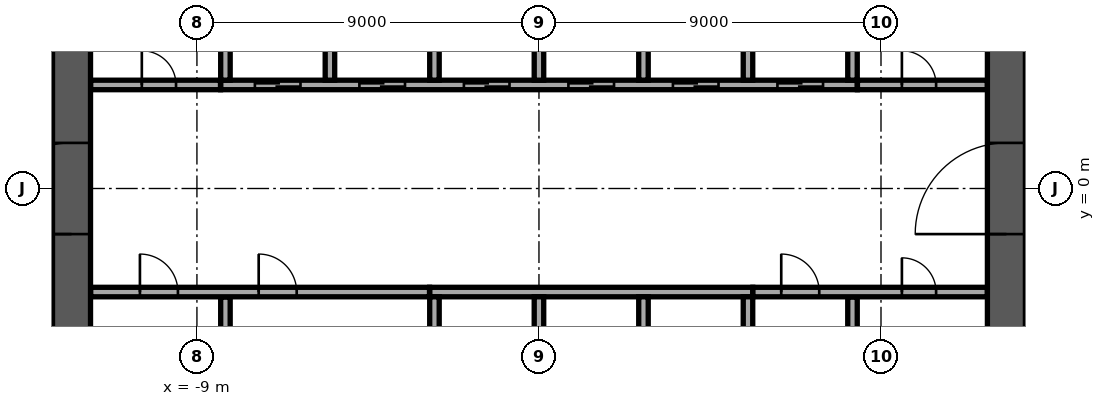
"""IFC4 building model, lengths in metres.
Left out: names, types, materials, properties, quantities, classifications, styles, units other than length and angle.
Written with IfcOpenShell. Run it as: python <this file> out.ifc"""

import sys

from ifc_helpers import new_model, si_unit, direction, frame, frame_2d, origin, place, context, subcontext, project, spatial, rectangle, extrude, element, fill, save


model = new_model("IFC4")
c1 = context("Model", 3, precision=1e-05, world=origin(), true_north=direction((0.0, 1.0)))
c2 = subcontext(c1, "Body", "Model", "MODEL_VIEW")
j1 = project(units=[si_unit("LENGTHUNIT", "METRE"), si_unit("PLANEANGLEUNIT", "RADIAN")], contexts=[c1])
p1 = place(None, origin())
s1 = spatial("IfcSite", under=j1, at=p1, CompositionType="ELEMENT")
p2 = place(p1, origin())
s2 = spatial("IfcBuilding", under=s1, at=p2, CompositionType="ELEMENT")
p3 = place(p2, frame((0.0, 0.0, 183.7)))
s3 = spatial("IfcBuildingStorey", under=s2, at=p3, CompositionType="ELEMENT", Elevation=183.7)
p4 = place(p3, frame((12.3, -11.8, 0.0), z_axis=(0.0, 0.0, 1.0), x_axis=(0.0, 1.0, 0.0)))
e1 = element("IfcWall", 1, at=p4, inside=s3, PredefinedType="SHEAR", context=c2, shape_type="SweptSolid", body=[
    extrude(rectangle(XDim=23.6, YDim=1.0, at=frame_2d((11.8, 0.0))), origin(), (0.0, 0.0, 1.0), 5.22),
])
p5 = place(p4, frame((10.6, 0.0, 0.0)))
e2 = element("IfcOpeningElement", 2, at=p5, cuts=e1, PredefinedType="OPENING", context=c2, shape_type="SweptSolid", body=[
    extrude(rectangle(XDim=2.4, YDim=2.4, at=frame_2d((1.2, 1.2))), frame((0.0, 0.51, 0.0), z_axis=(0.0, -1.0, 0.0), x_axis=(1.0, 0.0, 0.0)), (0.0, 0.0, 1.0), 1.02),
])
p6 = place(p3, frame((-12.3, -11.8, 0.0), z_axis=(0.0, 0.0, 1.0), x_axis=(0.0, 1.0, 0.0)))
e3 = element("IfcWall", 3, at=p6, inside=s3, PredefinedType="SHEAR", context=c2, shape_type="SweptSolid", body=[
    extrude(rectangle(XDim=23.6, YDim=1.0, at=frame_2d((11.8, 0.0))), origin(), (0.0, 0.0, 1.0), 5.22),
])
p7 = place(p6, frame((10.6, 0.0, 0.0)))
e4 = element("IfcOpeningElement", 4, at=p7, cuts=e3, PredefinedType="OPENING", context=c2, shape_type="SweptSolid", body=[
    extrude(rectangle(XDim=2.4, YDim=2.4, at=frame_2d((1.2, 1.2))), frame((0.0, 0.51, 0.0), z_axis=(0.0, -1.0, 0.0), x_axis=(1.0, 0.0, 0.0)), (0.0, 0.0, 1.0), 1.02),
])
p8 = place(p3, frame((-8.375, 2.725, 0.0), z_axis=(0.0, 0.0, 1.0), x_axis=(1.0, 0.0, 0.0)))
e5 = element("IfcWall", 5, at=p8, inside=s3, PredefinedType="SOLIDWALL", context=c2, shape_type="SweptSolid", body=[
    extrude(rectangle(XDim=16.75, YDim=0.25, at=frame_2d((8.375, 0.0))), origin(), (0.0, 0.0, 1.0), 5.22),
])
p9 = place(p8, frame((0.9, 0.0, 0.0)))
e6 = element("IfcOpeningElement", 6, at=p9, cuts=e5, PredefinedType="OPENING", context=c2, shape_type="SweptSolid", body=[
    extrude(rectangle(XDim=1.2, YDim=2.1, at=frame_2d((0.6, 1.05))), frame((0.0, 0.135, 0.0), z_axis=(0.0, -1.0, 0.0), x_axis=(1.0, 0.0, 0.0)), (0.0, 0.0, 1.0), 0.27),
])
p10 = place(p8, frame((3.65, 0.0, 0.0)))
e7 = element("IfcOpeningElement", 7, at=p10, cuts=e5, PredefinedType="OPENING", context=c2, shape_type="SweptSolid", body=[
    extrude(rectangle(XDim=1.2, YDim=2.1, at=frame_2d((0.6, 1.05))), frame((0.0, 0.135, 0.0), z_axis=(0.0, -1.0, 0.0), x_axis=(1.0, 0.0, 0.0)), (0.0, 0.0, 1.0), 0.27),
])
p11 = place(p8, frame((6.4, 0.0, 0.0)))
e8 = element("IfcOpeningElement", 8, at=p11, cuts=e5, PredefinedType="OPENING", context=c2, shape_type="SweptSolid", body=[
    extrude(rectangle(XDim=1.2, YDim=2.1, at=frame_2d((0.6, 1.05))), frame((0.0, 0.135, 0.0), z_axis=(0.0, -1.0, 0.0), x_axis=(1.0, 0.0, 0.0)), (0.0, 0.0, 1.0), 0.27),
])
p12 = place(p8, frame((9.15, 0.0, 0.0)))
e9 = element("IfcOpeningElement", 9, at=p12, cuts=e5, PredefinedType="OPENING", context=c2, shape_type="SweptSolid", body=[
    extrude(rectangle(XDim=1.2, YDim=2.1, at=frame_2d((0.6, 1.05))), frame((0.0, 0.135, 0.0), z_axis=(0.0, -1.0, 0.0), x_axis=(1.0, 0.0, 0.0)), (0.0, 0.0, 1.0), 0.27),
])
p13 = place(p8, frame((11.9, 0.0, 0.0)))
e10 = element("IfcOpeningElement", 10, at=p13, cuts=e5, PredefinedType="OPENING", context=c2, shape_type="SweptSolid", body=[
    extrude(rectangle(XDim=1.2, YDim=2.1, at=frame_2d((0.6, 1.05))), frame((0.0, 0.135, 0.0), z_axis=(0.0, -1.0, 0.0), x_axis=(1.0, 0.0, 0.0)), (0.0, 0.0, 1.0), 0.27),
])
p14 = place(p8, frame((14.65, 0.0, 0.0)))
e11 = element("IfcOpeningElement", 11, at=p14, cuts=e5, PredefinedType="OPENING", context=c2, shape_type="SweptSolid", body=[
    extrude(rectangle(XDim=1.2, YDim=2.1, at=frame_2d((0.6, 1.05))), frame((0.0, 0.135, 0.0), z_axis=(0.0, -1.0, 0.0), x_axis=(1.0, 0.0, 0.0)), (0.0, 0.0, 1.0), 0.27),
])
for number, where, z_axis, x_axis in (
    (12, (-8.25, 2.85, 0.0), (0.0, 0.0, 1.0), (0.0, 1.0, 0.0)),
    (13, (-5.5, 2.85, 0.0), (0.0, 0.0, 1.0), (0.0, 1.0, 0.0)),
    (14, (-2.75, 2.85, 0.0), (0.0, 0.0, 1.0), (0.0, 1.0, 0.0)),
    (15, (0.0, 2.85, 0.0), (0.0, 0.0, 1.0), (0.0, 1.0, 0.0)),
    (16, (2.75, 2.85, 0.0), (0.0, 0.0, 1.0), (0.0, 1.0, 0.0)),
    (17, (5.5, 2.85, 0.0), (0.0, 0.0, 1.0), (0.0, 1.0, 0.0)),
    (18, (8.25, 2.85, 0.0), (0.0, 0.0, 1.0), (0.0, 1.0, 0.0)),
):
    element("IfcWall", number, at=place(p3, frame(where, z_axis=z_axis, x_axis=x_axis)), inside=s3, PredefinedType="SOLIDWALL", context=c2, shape_type="SweptSolid", body=[
        extrude(rectangle(XDim=2.7, YDim=0.25, at=frame_2d((1.35, 0.0))), origin(), (0.0, 0.0, 1.0), 5.22),
    ])
p15 = place(p3, frame((-2.875, -2.725, 0.0), z_axis=(0.0, 0.0, 1.0), x_axis=(1.0, 0.0, 0.0)))
e19 = element("IfcWall", 19, at=p15, inside=s3, PredefinedType="SOLIDWALL", context=c2, shape_type="SweptSolid", body=[
    extrude(rectangle(XDim=8.5, YDim=0.25, at=frame_2d((4.25, 0.0))), origin(), (0.0, 0.0, 1.0), 5.22),
])
for number, where, z_axis, x_axis in (
    (20, (-2.75, -5.55, 0.0), (0.0, 0.0, 1.0), (0.0, 1.0, 0.0)),
    (21, (0.0, -5.55, 0.0), (0.0, 0.0, 1.0), (0.0, 1.0, 0.0)),
    (22, (2.75, -5.55, 0.0), (0.0, 0.0, 1.0), (0.0, 1.0, 0.0)),
    (23, (5.5, -5.55, 0.0), (0.0, 0.0, 1.0), (0.0, 1.0, 0.0)),
):
    element("IfcWall", number, at=place(p3, frame(where, z_axis=z_axis, x_axis=x_axis)), inside=s3, PredefinedType="SOLIDWALL", context=c2, shape_type="SweptSolid", body=[
        extrude(rectangle(XDim=2.7, YDim=0.25, at=frame_2d((1.35, 0.0))), origin(), (0.0, 0.0, 1.0), 5.22),
    ])
for number, where, z_axis, x_axis in (
    (24, (-8.25, -5.545, 0.0), (0.0, 0.0, 1.0), (0.0, 1.0, 0.0)),
    (25, (8.25, -5.545, 0.0), (0.0, 0.0, 1.0), (0.0, 1.0, 0.0)),
):
    element("IfcWall", number, at=place(p3, frame(where, z_axis=z_axis, x_axis=x_axis)), inside=s3, PredefinedType="PARTITIONING", context=c2, shape_type="SweptSolid", body=[
        extrude(rectangle(XDim=2.69, YDim=0.25, at=frame_2d((1.345, 0.0))), origin(), (0.0, 0.0, 1.0), 5.22),
    ])
p16 = place(p3, frame((-11.795, -2.725, 0.0), z_axis=(0.0, 0.0, 1.0), x_axis=(1.0, 0.0, 0.0)))
e26 = element("IfcWall", 26, at=p16, inside=s3, PredefinedType="PARTITIONING", context=c2, shape_type="SweptSolid", body=[
    extrude(rectangle(XDim=8.915, YDim=0.25, at=frame_2d((4.458, 0.0))), origin(), (0.0, 0.0, 1.0), 5.22),
])
p17 = place(p16, frame((1.295, 0.0, 0.0)))
e27 = element("IfcOpeningElement", 27, at=p17, cuts=e26, PredefinedType="OPENING", context=c2, shape_type="SweptSolid", body=[
    extrude(rectangle(XDim=1.0, YDim=2.1, at=frame_2d((0.5, 1.05))), frame((0.0, 0.135, 0.0), z_axis=(0.0, -1.0, 0.0), x_axis=(1.0, 0.0, 0.0)), (0.0, 0.0, 1.0), 0.27),
])
p18 = place(p16, frame((4.42, 0.0, 0.0)))
e28 = element("IfcOpeningElement", 28, at=p18, cuts=e26, PredefinedType="OPENING", context=c2, shape_type="SweptSolid", body=[
    extrude(rectangle(XDim=1.0, YDim=2.1, at=frame_2d((0.5, 1.05))), frame((0.0, 0.135, 0.0), z_axis=(0.0, -1.0, 0.0), x_axis=(1.0, 0.0, 0.0)), (0.0, 0.0, 1.0), 0.27),
])
p19 = place(p3, frame((5.63, -2.725, 0.0), z_axis=(0.0, 0.0, 1.0), x_axis=(1.0, 0.0, 0.0)))
e29 = element("IfcWall", 29, at=p19, inside=s3, PredefinedType="PARTITIONING", context=c2, shape_type="SweptSolid", body=[
    extrude(rectangle(XDim=6.165, YDim=0.25, at=frame_2d((3.083, 0.0))), origin(), (0.0, 0.0, 1.0), 5.22),
])
p20 = place(p19, frame((0.745, 0.0, 0.0)))
e30 = element("IfcOpeningElement", 30, at=p20, cuts=e29, PredefinedType="OPENING", context=c2, shape_type="SweptSolid", body=[
    extrude(rectangle(XDim=1.0, YDim=2.1, at=frame_2d((0.5, 1.05))), frame((0.0, 0.135, 0.0), z_axis=(0.0, -1.0, 0.0), x_axis=(1.0, 0.0, 0.0)), (0.0, 0.0, 1.0), 0.27),
])
p21 = place(p19, frame((3.92, 0.0, 0.0)))
e31 = element("IfcOpeningElement", 31, at=p21, cuts=e29, PredefinedType="OPENING", context=c2, shape_type="SweptSolid", body=[
    extrude(rectangle(XDim=0.9, YDim=2.1, at=frame_2d((0.45, 1.05))), frame((0.0, 0.135, 0.0), z_axis=(0.0, -1.0, 0.0), x_axis=(1.0, 0.0, 0.0)), (0.0, 0.0, 1.0), 0.27),
])
p22 = place(p3, frame((-11.795, 2.725, 0.0), z_axis=(0.0, 0.0, 1.0), x_axis=(1.0, 0.0, 0.0)))
e32 = element("IfcWall", 32, at=p22, inside=s3, PredefinedType="PARTITIONING", context=c2, shape_type="SweptSolid", body=[
    extrude(rectangle(XDim=3.415, YDim=0.25, at=frame_2d((1.708, 0.0))), origin(), (0.0, 0.0, 1.0), 5.22),
])
p23 = place(p22, frame((1.345, 0.0, 0.0)))
e33 = element("IfcOpeningElement", 33, at=p23, cuts=e32, PredefinedType="OPENING", context=c2, shape_type="SweptSolid", body=[
    extrude(rectangle(XDim=0.9, YDim=2.1, at=frame_2d((0.45, 1.05))), frame((0.0, 0.135, 0.0), z_axis=(0.0, -1.0, 0.0), x_axis=(1.0, 0.0, 0.0)), (0.0, 0.0, 1.0), 0.27),
])
p24 = place(p3, frame((8.38, 2.725, 0.0), z_axis=(0.0, 0.0, 1.0), x_axis=(1.0, 0.0, 0.0)))
e34 = element("IfcWall", 34, at=p24, inside=s3, PredefinedType="PARTITIONING", context=c2, shape_type="SweptSolid", body=[
    extrude(rectangle(XDim=3.415, YDim=0.25, at=frame_2d((1.708, 0.0))), origin(), (0.0, 0.0, 1.0), 5.22),
])
p25 = place(p24, frame((1.17, 0.0, 0.0)))
e35 = element("IfcOpeningElement", 35, at=p25, cuts=e34, PredefinedType="OPENING", context=c2, shape_type="SweptSolid", body=[
    extrude(rectangle(XDim=0.9, YDim=2.1, at=frame_2d((0.45, 1.05))), frame((0.0, 0.135, 0.0), z_axis=(0.0, -1.0, 0.0), x_axis=(1.0, 0.0, 0.0)), (0.0, 0.0, 1.0), 0.27),
])
p26 = place(p3, frame((-36.47, -2.156, 0.0), z_axis=(0.0, 0.0, 1.0), x_axis=(0.629322340193, -0.777144383068, 0.0)))
e36 = element("IfcWall", 36, at=p26, inside=s3, PredefinedType="STANDARD", context=c2, shape_type="SweptSolid", body=[
    extrude(rectangle(XDim=42.552, YDim=0.6, at=frame_2d((21.276, 0.0))), origin(), (0.0, 0.0, 1.0), 5.22),
])
p27 = place(p26, frame((1.178, 0.0, 0.6)))
e37 = element("IfcOpeningElement", 37, at=p27, cuts=e36, PredefinedType="OPENING", context=c2, shape_type="SweptSolid", body=[
    extrude(rectangle(XDim=1.8, YDim=4.17, at=frame_2d((0.9, 2.085))), frame((0.0, 0.31, 0.0), z_axis=(0.0, -1.0, 0.0), x_axis=(1.0, 0.0, 0.0)), (0.0, 0.0, 1.0), 0.62),
])
p28 = place(p26, frame((5.396, 0.0, 0.6)))
e38 = element("IfcOpeningElement", 38, at=p28, cuts=e36, PredefinedType="OPENING", context=c2, shape_type="SweptSolid", body=[
    extrude(rectangle(XDim=1.8, YDim=4.17, at=frame_2d((0.9, 2.085))), frame((0.0, 0.31, 0.0), z_axis=(0.0, -1.0, 0.0), x_axis=(1.0, 0.0, 0.0)), (0.0, 0.0, 1.0), 0.62),
])
p29 = place(p26, frame((9.676, 0.0, 0.6)))
e39 = element("IfcOpeningElement", 39, at=p29, cuts=e36, PredefinedType="OPENING", context=c2, shape_type="SweptSolid", body=[
    extrude(rectangle(XDim=1.8, YDim=4.17, at=frame_2d((0.9, 2.085))), frame((0.0, 0.31, 0.0), z_axis=(0.0, -1.0, 0.0), x_axis=(1.0, 0.0, 0.0)), (0.0, 0.0, 1.0), 0.62),
])
p30 = place(p26, frame((35.356, 0.0, 0.6)))
e40 = element("IfcOpeningElement", 40, at=p30, cuts=e36, PredefinedType="OPENING", context=c2, shape_type="SweptSolid", body=[
    extrude(rectangle(XDim=1.8, YDim=4.17, at=frame_2d((0.9, 2.085))), frame((0.0, 0.31, 0.0), z_axis=(0.0, -1.0, 0.0), x_axis=(1.0, 0.0, 0.0)), (0.0, 0.0, 1.0), 0.62),
])
p31 = place(p26, frame((39.573, 0.0, 0.6)))
e41 = element("IfcOpeningElement", 41, at=p31, cuts=e36, PredefinedType="OPENING", context=c2, shape_type="SweptSolid", body=[
    extrude(rectangle(XDim=1.8, YDim=4.17, at=frame_2d((0.9, 2.085))), frame((0.0, 0.31, 0.0), z_axis=(0.0, -1.0, 0.0), x_axis=(1.0, 0.0, 0.0)), (0.0, 0.0, 1.0), 0.62),
])
p32 = place(p3, frame((36.47, 2.156, 0.0), z_axis=(0.0, 0.0, 1.0), x_axis=(-0.62932061547, 0.777145779725, 0.0)))
e42 = element("IfcWall", 42, at=p32, inside=s3, PredefinedType="STANDARD", context=c2, shape_type="SweptSolid", body=[
    extrude(rectangle(XDim=42.176, YDim=0.6, at=frame_2d((21.088, 0.0))), origin(), (0.0, 0.0, 1.0), 5.22),
])
p33 = place(p32, frame((1.138, 0.0, 0.6)))
e43 = element("IfcOpeningElement", 43, at=p33, cuts=e42, PredefinedType="OPENING", context=c2, shape_type="SweptSolid", body=[
    extrude(rectangle(XDim=2.3, YDim=4.17, at=frame_2d((1.15, 2.085))), frame((0.0, 0.31, 0.0), z_axis=(0.0, -1.0, 0.0), x_axis=(1.0, 0.0, 0.0)), (0.0, 0.0, 1.0), 0.62),
])
p34 = place(p32, frame((5.776, 0.0, 0.6)))
e44 = element("IfcOpeningElement", 44, at=p34, cuts=e42, PredefinedType="OPENING", context=c2, shape_type="SweptSolid", body=[
    extrude(rectangle(XDim=2.3, YDim=4.17, at=frame_2d((1.15, 2.085))), frame((0.0, 0.31, 0.0), z_axis=(0.0, -1.0, 0.0), x_axis=(1.0, 0.0, 0.0)), (0.0, 0.0, 1.0), 0.62),
])
p35 = place(p32, frame((33.976, 0.0, 0.6)))
e45 = element("IfcOpeningElement", 45, at=p35, cuts=e42, PredefinedType="OPENING", context=c2, shape_type="SweptSolid", body=[
    extrude(rectangle(XDim=2.3, YDim=4.17, at=frame_2d((1.15, 2.085))), frame((0.0, 0.31, 0.0), z_axis=(0.0, -1.0, 0.0), x_axis=(1.0, 0.0, 0.0)), (0.0, 0.0, 1.0), 0.62),
])
p36 = place(p32, frame((38.676, 0.0, 0.6)))
e46 = element("IfcOpeningElement", 46, at=p36, cuts=e42, PredefinedType="OPENING", context=c2, shape_type="SweptSolid", body=[
    extrude(rectangle(XDim=2.3, YDim=4.17, at=frame_2d((1.15, 2.085))), frame((0.0, 0.31, 0.0), z_axis=(0.0, -1.0, 0.0), x_axis=(1.0, 0.0, 0.0)), (0.0, 0.0, 1.0), 0.62),
])
p37 = place(p5, origin())
e47 = element("IfcDoor", 47, at=p37, inside=s3, OperationType="SINGLE_SWING_LEFT", PredefinedType="DOOR", context=c2, shape_type="SweptSolid", body=[
    extrude(rectangle(XDim=2.4, YDim=2.4, at=frame_2d((1.2, 1.2))), frame((0.0, 0.025, 0.0), z_axis=(0.0, -1.0, 0.0), x_axis=(1.0, 0.0, 0.0)), (0.0, 0.0, 1.0), 0.05),
])
fill(e2, e47)
p38 = place(p7, origin())
e48 = element("IfcDoor", 48, at=p38, inside=s3, OperationType="SINGLE_SWING_LEFT", PredefinedType="DOOR", context=c2, shape_type="SweptSolid", body=[
    extrude(rectangle(XDim=2.4, YDim=2.4, at=frame_2d((1.2, 1.2))), frame((0.0, 0.025, 0.0), z_axis=(0.0, -1.0, 0.0), x_axis=(1.0, 0.0, 0.0)), (0.0, 0.0, 1.0), 0.05),
])
fill(e4, e48)
p39 = place(p9, origin())
e49 = element("IfcDoor", 49, at=p39, inside=s3, OperationType="DOUBLE_DOOR_SLIDING", PredefinedType="DOOR", context=c2, shape_type="SweptSolid", body=[
    extrude(rectangle(XDim=1.2, YDim=2.1, at=frame_2d((0.6, 1.05))), frame((0.0, 0.025, 0.0), z_axis=(0.0, -1.0, 0.0), x_axis=(1.0, 0.0, 0.0)), (0.0, 0.0, 1.0), 0.05),
])
fill(e6, e49)
p40 = place(p10, origin())
e50 = element("IfcDoor", 50, at=p40, inside=s3, OperationType="DOUBLE_DOOR_SLIDING", PredefinedType="DOOR", context=c2, shape_type="SweptSolid", body=[
    extrude(rectangle(XDim=1.2, YDim=2.1, at=frame_2d((0.6, 1.05))), frame((0.0, 0.025, 0.0), z_axis=(0.0, -1.0, 0.0), x_axis=(1.0, 0.0, 0.0)), (0.0, 0.0, 1.0), 0.05),
])
fill(e7, e50)
p41 = place(p11, origin())
e51 = element("IfcDoor", 51, at=p41, inside=s3, OperationType="DOUBLE_DOOR_SLIDING", PredefinedType="DOOR", context=c2, shape_type="SweptSolid", body=[
    extrude(rectangle(XDim=1.2, YDim=2.1, at=frame_2d((0.6, 1.05))), frame((0.0, 0.025, 0.0), z_axis=(0.0, -1.0, 0.0), x_axis=(1.0, 0.0, 0.0)), (0.0, 0.0, 1.0), 0.05),
])
fill(e8, e51)
p42 = place(p12, origin())
e52 = element("IfcDoor", 52, at=p42, inside=s3, OperationType="DOUBLE_DOOR_SLIDING", PredefinedType="DOOR", context=c2, shape_type="SweptSolid", body=[
    extrude(rectangle(XDim=1.2, YDim=2.1, at=frame_2d((0.6, 1.05))), frame((0.0, 0.025, 0.0), z_axis=(0.0, -1.0, 0.0), x_axis=(1.0, 0.0, 0.0)), (0.0, 0.0, 1.0), 0.05),
])
fill(e9, e52)
p43 = place(p13, origin())
e53 = element("IfcDoor", 53, at=p43, inside=s3, OperationType="DOUBLE_DOOR_SLIDING", PredefinedType="DOOR", context=c2, shape_type="SweptSolid", body=[
    extrude(rectangle(XDim=1.2, YDim=2.1, at=frame_2d((0.6, 1.05))), frame((0.0, 0.025, 0.0), z_axis=(0.0, -1.0, 0.0), x_axis=(1.0, 0.0, 0.0)), (0.0, 0.0, 1.0), 0.05),
])
fill(e10, e53)
p44 = place(p14, origin())
e54 = element("IfcDoor", 54, at=p44, inside=s3, OperationType="DOUBLE_DOOR_SLIDING", PredefinedType="DOOR", context=c2, shape_type="SweptSolid", body=[
    extrude(rectangle(XDim=1.2, YDim=2.1, at=frame_2d((0.6, 1.05))), frame((0.0, 0.025, 0.0), z_axis=(0.0, -1.0, 0.0), x_axis=(1.0, 0.0, 0.0)), (0.0, 0.0, 1.0), 0.05),
])
fill(e11, e54)
p45 = place(p17, origin())
e55 = element("IfcDoor", 55, at=p45, inside=s3, OperationType="SINGLE_SWING_RIGHT", PredefinedType="DOOR", context=c2, shape_type="SweptSolid", body=[
    extrude(rectangle(XDim=1.0, YDim=2.1, at=frame_2d((0.5, 1.05))), frame((0.0, 0.025, 0.0), z_axis=(0.0, -1.0, 0.0), x_axis=(1.0, 0.0, 0.0)), (0.0, 0.0, 1.0), 0.05),
])
fill(e27, e55)
p46 = place(p20, origin())
e56 = element("IfcDoor", 56, at=p46, inside=s3, OperationType="SINGLE_SWING_RIGHT", PredefinedType="DOOR", context=c2, shape_type="SweptSolid", body=[
    extrude(rectangle(XDim=1.0, YDim=2.1, at=frame_2d((0.5, 1.05))), frame((0.0, 0.025, 0.0), z_axis=(0.0, -1.0, 0.0), x_axis=(1.0, 0.0, 0.0)), (0.0, 0.0, 1.0), 0.05),
])
fill(e30, e56)
p47 = place(p25, origin())
e57 = element("IfcDoor", 57, at=p47, inside=s3, OperationType="SINGLE_SWING_RIGHT", PredefinedType="DOOR", context=c2, shape_type="SweptSolid", body=[
    extrude(rectangle(XDim=0.9, YDim=2.1, at=frame_2d((0.45, 1.05))), frame((0.0, 0.025, 0.0), z_axis=(0.0, -1.0, 0.0), x_axis=(1.0, 0.0, 0.0)), (0.0, 0.0, 1.0), 0.05),
])
fill(e35, e57)
p48 = place(p21, origin())
e58 = element("IfcDoor", 58, at=p48, inside=s3, OperationType="SINGLE_SWING_RIGHT", PredefinedType="DOOR", context=c2, shape_type="SweptSolid", body=[
    extrude(rectangle(XDim=0.9, YDim=2.1, at=frame_2d((0.45, 1.05))), frame((0.0, 0.025, 0.0), z_axis=(0.0, -1.0, 0.0), x_axis=(1.0, 0.0, 0.0)), (0.0, 0.0, 1.0), 0.05),
])
fill(e31, e58)
p49 = place(p23, origin())
e59 = element("IfcDoor", 59, at=p49, inside=s3, OperationType="SINGLE_SWING_RIGHT", PredefinedType="DOOR", context=c2, shape_type="SweptSolid", body=[
    extrude(rectangle(XDim=0.9, YDim=2.1, at=frame_2d((0.45, 1.05))), frame((0.0, 0.025, 0.0), z_axis=(0.0, -1.0, 0.0), x_axis=(1.0, 0.0, 0.0)), (0.0, 0.0, 1.0), 0.05),
])
fill(e33, e59)
p50 = place(p18, origin())
e60 = element("IfcDoor", 60, at=p50, inside=s3, OperationType="SINGLE_SWING_RIGHT", PredefinedType="DOOR", context=c2, shape_type="SweptSolid", body=[
    extrude(rectangle(XDim=1.0, YDim=2.1, at=frame_2d((0.5, 1.05))), frame((0.0, 0.025, 0.0), z_axis=(0.0, -1.0, 0.0), x_axis=(1.0, 0.0, 0.0)), (0.0, 0.0, 1.0), 0.05),
])
fill(e28, e60)
save(model, sys.argv[1])
